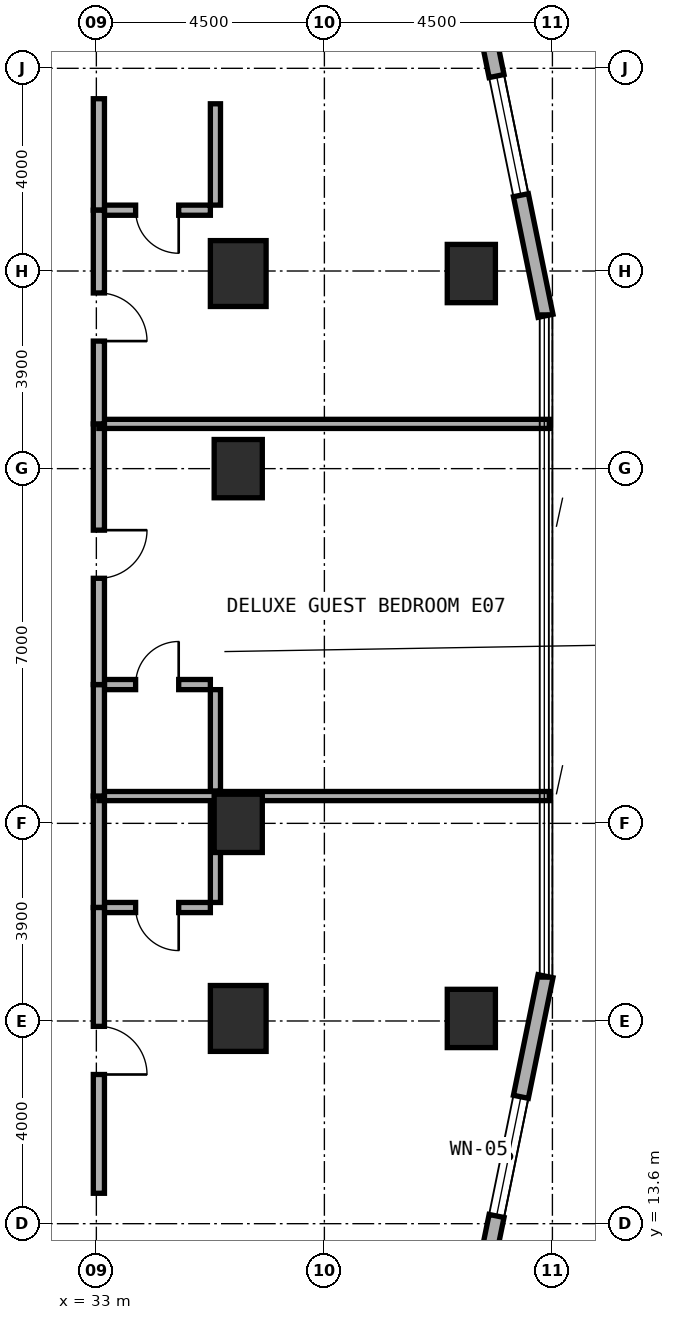
"""IFC4 building model, lengths in metres.
Left out: names, types, materials, properties, quantities, classifications, styles, units other than length and angle.
Written with IfcOpenShell. Run it as: python <this file> out.ifc"""

import sys

from ifc_helpers import new_model, si_unit, direction, frame, frame_2d, origin, origin_2d, place, context, subcontext, project, spatial, rectangle, extrude, element, fill, save


model = new_model("IFC4")
c1 = context("Model", 3, precision=1e-05, world=origin(), true_north=direction((0.0, 1.0)))
c2 = subcontext(c1, "Body", "Model", "MODEL_VIEW")
j1 = project(units=[si_unit("LENGTHUNIT", "METRE"), si_unit("PLANEANGLEUNIT", "RADIAN")], contexts=[c1])
p1 = place(None, origin())
s1 = spatial("IfcSite", under=j1, at=p1, CompositionType="ELEMENT")
p2 = place(p1, origin())
s2 = spatial("IfcBuilding", under=s1, at=p2, CompositionType="ELEMENT")
p3 = place(p2, frame((0.0, 0.0, 52.0)))
s3 = spatial("IfcBuildingStorey", under=s2, at=p3, CompositionType="ELEMENT", Elevation=52.0)
for number, where, z_axis, x_axis in (
    (1, (35.8, 21.5, 0.0), (0.0, 0.0, 1.0), (1.0, 0.0, 0.0)),
    (2, (35.8, 28.5, 0.0), (0.0, 0.0, 1.0), (1.0, 0.0, 0.0)),
):
    element("IfcColumn", number, at=place(p3, frame(where, z_axis=z_axis, x_axis=x_axis)), inside=s3, PredefinedType="COLUMN", context=c2, shape_type="SweptSolid", body=[
        extrude(rectangle(XDim=0.95, YDim=1.15, at=origin_2d()), origin(), (0.0, 0.0, 1.0), 3.5),
    ])
for number, where, z_axis, x_axis in (
    (3, (35.8, 17.65, 0.0), (0.0, 0.0, 1.0), (1.0, 0.0, 0.0)),
    (4, (35.8, 32.35, 0.0), (0.0, 0.0, 1.0), (1.0, 0.0, 0.0)),
):
    element("IfcColumn", number, at=place(p3, frame(where, z_axis=z_axis, x_axis=x_axis)), inside=s3, PredefinedType="COLUMN", context=c2, shape_type="SweptSolid", body=[
        extrude(rectangle(XDim=1.1, YDim=1.3, at=origin_2d()), origin(), (0.0, 0.0, 1.0), 3.5),
    ])
for number, where, z_axis, x_axis in (
    (5, (40.4, 17.65, 0.0), (0.0, 0.0, 1.0), (1.0, 0.0, 0.0)),
    (6, (40.4, 32.35, 0.0), (0.0, 0.0, 1.0), (1.0, 0.0, 0.0)),
):
    element("IfcColumn", number, at=place(p3, frame(where, z_axis=z_axis, x_axis=x_axis)), inside=s3, PredefinedType="COLUMN", context=c2, shape_type="SweptSolid", body=[
        extrude(rectangle(XDim=0.95, YDim=1.15, at=origin_2d()), origin(), (0.0, 0.0, 1.0), 3.5),
    ])
p4 = place(p3, frame((39.851, 8.622, 0.0), z_axis=(0.0, 0.0, 1.0), x_axis=(0.199990901713, 0.979797754249, 0.0)))
e7 = element("IfcWall", 7, at=p4, inside=s3, PredefinedType="STANDARD", context=c2, shape_type="SweptSolid", body=[
    extrude(rectangle(XDim=10.065, YDim=0.3, at=frame_2d((5.033, 0.0))), origin(), (0.0, 0.0, 1.0), 3.22),
])
p5 = place(p4, frame((0.378, 0.0, 0.85)))
e8 = element("IfcOpeningElement", 8, at=p5, cuts=e7, PredefinedType="OPENING", context=c2, shape_type="SweptSolid", body=[
    extrude(rectangle(XDim=1.8, YDim=1.5, at=frame_2d((0.9, 0.75))), frame((0.0, 0.16, 0.0), z_axis=(0.0, -1.0, 0.0), x_axis=(1.0, 0.0, 0.0)), (0.0, 0.0, 1.0), 0.32),
])
p6 = place(p4, frame((5.236, 0.0, 0.8)))
e9 = element("IfcOpeningElement", 9, at=p6, cuts=e7, PredefinedType="OPENING", context=c2, shape_type="SweptSolid", body=[
    extrude(rectangle(XDim=2.4, YDim=1.6, at=frame_2d((1.2, 0.8))), frame((0.0, 0.16, 0.0), z_axis=(0.0, -1.0, 0.0), x_axis=(1.0, 0.0, 0.0)), (0.0, 0.0, 1.0), 0.32),
])
p7 = place(p3, frame((41.864, 31.516, 0.0), z_axis=(0.0, 0.0, 1.0), x_axis=(-0.199990901713, 0.979797754249, 0.0)))
e10 = element("IfcWall", 10, at=p7, inside=s3, PredefinedType="STANDARD", context=c2, shape_type="SweptSolid", body=[
    extrude(rectangle(XDim=10.065, YDim=0.3, at=frame_2d((5.033, 0.0))), origin(), (0.0, 0.0, 1.0), 3.22),
])
p8 = place(p7, frame((2.429, 0.0, 0.8)))
e11 = element("IfcOpeningElement", 11, at=p8, cuts=e10, PredefinedType="OPENING", context=c2, shape_type="SweptSolid", body=[
    extrude(rectangle(XDim=2.4, YDim=1.6, at=frame_2d((1.2, 0.8))), frame((0.0, 0.16, 0.0), z_axis=(0.0, -1.0, 0.0), x_axis=(1.0, 0.0, 0.0)), (0.0, 0.0, 1.0), 0.32),
])
p9 = place(p7, frame((7.887, 0.0, 0.85)))
e12 = element("IfcOpeningElement", 12, at=p9, cuts=e10, PredefinedType="OPENING", context=c2, shape_type="SweptSolid", body=[
    extrude(rectangle(XDim=1.8, YDim=1.5, at=frame_2d((0.9, 0.75))), frame((0.0, 0.16, 0.0), z_axis=(0.0, -1.0, 0.0), x_axis=(1.0, 0.0, 0.0)), (0.0, 0.0, 1.0), 0.32),
])
p10 = place(p3, frame((33.15, 19.839, 0.0), z_axis=(0.0, 0.0, 1.0), x_axis=(1.0, 0.0, 0.0)))
e13 = element("IfcWall", 13, at=p10, inside=s3, PredefinedType="PLUMBINGWALL", context=c2, shape_type="SweptSolid", body=[
    extrude(rectangle(XDim=2.1, YDim=0.2, at=frame_2d((1.05, 0.0))), origin(), (0.0, 0.0, 1.0), 3.22),
])
p11 = place(p10, frame((0.625, 0.0, 0.0)))
e14 = element("IfcOpeningElement", 14, at=p11, cuts=e13, PredefinedType="OPENING", context=c2, shape_type="SweptSolid", body=[
    extrude(rectangle(XDim=0.85, YDim=2.1, at=frame_2d((0.425, 1.05))), frame((0.0, 0.11, 0.0), z_axis=(0.0, -1.0, 0.0), x_axis=(1.0, 0.0, 0.0)), (0.0, 0.0, 1.0), 0.22),
])
p12 = place(p3, frame((35.35, 19.939, 0.0), z_axis=(0.0, 0.0, 1.0), x_axis=(0.0, 1.0, 0.0)))
e15 = element("IfcWall", 15, at=p12, inside=s3, PredefinedType="PLUMBINGWALL", context=c2, shape_type="SweptSolid", body=[
    extrude(rectangle(XDim=2.0, YDim=0.2, at=frame_2d((1.0, 0.0))), origin(), (0.0, 0.0, 1.0), 2.395),
])
p13 = place(p3, frame((33.05, 19.839, 0.0), z_axis=(0.0, 0.0, 1.0), x_axis=(0.0, 1.0, 0.0)))
e16 = element("IfcWall", 16, at=p13, inside=s3, PredefinedType="SOLIDWALL", context=c2, shape_type="SweptSolid", body=[
    extrude(rectangle(XDim=2.2, YDim=0.22, at=frame_2d((1.1, 0.0))), origin(), (0.0, 0.0, 1.0), 2.395),
])
p14 = place(p3, frame((33.05, 14.2, 0.0), z_axis=(0.0, 0.0, 1.0), x_axis=(0.0, 1.0, 0.0)))
e17 = element("IfcWall", 17, at=p14, inside=s3, PredefinedType="SOLIDWALL", context=c2, shape_type="SweptSolid", body=[
    extrude(rectangle(XDim=5.639, YDim=0.22, at=frame_2d((2.82, 0.0))), origin(), (0.0, 0.0, 1.0), 2.395),
])
p15 = place(p14, frame((2.344, 0.0, 0.0)))
e18 = element("IfcOpeningElement", 18, at=p15, cuts=e17, PredefinedType="OPENING", context=c2, shape_type="SweptSolid", body=[
    extrude(rectangle(XDim=0.95, YDim=2.1, at=frame_2d((0.475, 1.05))), frame((0.0, 0.12, 0.0), z_axis=(0.0, -1.0, 0.0), x_axis=(1.0, 0.0, 0.0)), (0.0, 0.0, 1.0), 0.24),
])
p16 = place(p3, frame((33.05, 22.039, 0.0), z_axis=(0.0, 0.0, 1.0), x_axis=(1.0, 0.0, 0.0)))
e19 = element("IfcWall", 19, at=p16, inside=s3, PredefinedType="SOLIDWALL", context=c2, shape_type="SweptSolid", body=[
    extrude(rectangle(XDim=8.89, YDim=0.18, at=frame_2d((4.445, 0.0))), origin(), (0.0, 0.0, 1.0), 2.745),
])
p17 = place(p3, frame((33.15, 24.239, 0.0), z_axis=(0.0, 0.0, 1.0), x_axis=(1.0, 0.0, 0.0)))
e20 = element("IfcWall", 20, at=p17, inside=s3, PredefinedType="PLUMBINGWALL", context=c2, shape_type="SweptSolid", body=[
    extrude(rectangle(XDim=2.1, YDim=0.2, at=frame_2d((1.05, 0.0))), origin(), (0.0, 0.0, 1.0), 3.22),
])
p18 = place(p17, frame((0.625, 0.0, 0.0)))
e21 = element("IfcOpeningElement", 21, at=p18, cuts=e20, PredefinedType="OPENING", context=c2, shape_type="SweptSolid", body=[
    extrude(rectangle(XDim=0.85, YDim=2.1, at=frame_2d((0.425, 1.05))), frame((0.0, 0.11, 0.0), z_axis=(0.0, -1.0, 0.0), x_axis=(1.0, 0.0, 0.0)), (0.0, 0.0, 1.0), 0.22),
])
p19 = place(p3, frame((35.35, 22.139, 0.0), z_axis=(0.0, 0.0, 1.0), x_axis=(0.0, 1.0, 0.0)))
e22 = element("IfcWall", 22, at=p19, inside=s3, PredefinedType="PLUMBINGWALL", context=c2, shape_type="SweptSolid", body=[
    extrude(rectangle(XDim=2.0, YDim=0.2, at=frame_2d((1.0, 0.0))), origin(), (0.0, 0.0, 1.0), 3.22),
])
p20 = place(p3, frame((33.05, 22.039, 0.0), z_axis=(0.0, 0.0, 1.0), x_axis=(0.0, 1.0, 0.0)))
e23 = element("IfcWall", 23, at=p20, inside=s3, PredefinedType="SOLIDWALL", context=c2, shape_type="SweptSolid", body=[
    extrude(rectangle(XDim=2.2, YDim=0.22, at=frame_2d((1.1, 0.0))), origin(), (0.0, 0.0, 1.0), 3.22),
])
p21 = place(p3, frame((33.05, 24.239, 0.0), z_axis=(0.0, 0.0, 1.0), x_axis=(0.0, 1.0, 0.0)))
e24 = element("IfcWall", 24, at=p21, inside=s3, PredefinedType="SOLIDWALL", context=c2, shape_type="SweptSolid", body=[
    extrude(rectangle(XDim=5.144, YDim=0.22, at=frame_2d((2.572, 0.0))), origin(), (0.0, 0.0, 1.0), 2.395),
])
p22 = place(p21, frame((2.097, 0.0, 0.0)))
e25 = element("IfcOpeningElement", 25, at=p22, cuts=e24, PredefinedType="OPENING", context=c2, shape_type="SweptSolid", body=[
    extrude(rectangle(XDim=0.95, YDim=2.1, at=frame_2d((0.475, 1.05))), frame((0.0, 0.12, 0.0), z_axis=(0.0, -1.0, 0.0), x_axis=(1.0, 0.0, 0.0)), (0.0, 0.0, 1.0), 0.24),
])
p23 = place(p3, frame((33.05, 29.383, 0.0), z_axis=(0.0, 0.0, 1.0), x_axis=(1.0, 0.0, 0.0)))
e26 = element("IfcWall", 26, at=p23, inside=s3, PredefinedType="SOLIDWALL", context=c2, shape_type="SweptSolid", body=[
    extrude(rectangle(XDim=8.89, YDim=0.18, at=frame_2d((4.445, 0.0))), origin(), (0.0, 0.0, 1.0), 2.745),
])
p24 = place(p3, frame((33.15, 33.6, 0.0), z_axis=(0.0, 0.0, 1.0), x_axis=(1.0, 0.0, 0.0)))
e27 = element("IfcWall", 27, at=p24, inside=s3, PredefinedType="PLUMBINGWALL", context=c2, shape_type="SweptSolid", body=[
    extrude(rectangle(XDim=2.1, YDim=0.2, at=frame_2d((1.05, 0.0))), origin(), (0.0, 0.0, 1.0), 3.22),
])
p25 = place(p24, frame((0.625, 0.0, 0.0)))
e28 = element("IfcOpeningElement", 28, at=p25, cuts=e27, PredefinedType="OPENING", context=c2, shape_type="SweptSolid", body=[
    extrude(rectangle(XDim=0.85, YDim=2.1, at=frame_2d((0.425, 1.05))), frame((0.0, 0.11, 0.0), z_axis=(0.0, -1.0, 0.0), x_axis=(1.0, 0.0, 0.0)), (0.0, 0.0, 1.0), 0.22),
])
p26 = place(p3, frame((35.35, 33.7, 0.0), z_axis=(0.0, 0.0, 1.0), x_axis=(0.0, 1.0, 0.0)))
e29 = element("IfcWall", 29, at=p26, inside=s3, PredefinedType="PLUMBINGWALL", context=c2, shape_type="SweptSolid", body=[
    extrude(rectangle(XDim=2.0, YDim=0.2, at=frame_2d((1.0, 0.0))), origin(), (0.0, 0.0, 1.0), 2.745),
])
p27 = place(p3, frame((33.05, 33.6, 0.0), z_axis=(0.0, 0.0, 1.0), x_axis=(0.0, 1.0, 0.0)))
e30 = element("IfcWall", 30, at=p27, inside=s3, PredefinedType="SOLIDWALL", context=c2, shape_type="SweptSolid", body=[
    extrude(rectangle(XDim=2.2, YDim=0.22, at=frame_2d((1.1, 0.0))), origin(), (0.0, 0.0, 1.0), 3.22),
])
p28 = place(p3, frame((33.05, 29.383, 0.0), z_axis=(0.0, 0.0, 1.0), x_axis=(0.0, 1.0, 0.0)))
e31 = element("IfcWall", 31, at=p28, inside=s3, PredefinedType="SOLIDWALL", context=c2, shape_type="SweptSolid", body=[
    extrude(rectangle(XDim=4.217, YDim=0.22, at=frame_2d((2.108, 0.0))), origin(), (0.0, 0.0, 1.0), 2.395),
])
p29 = place(p28, frame((1.634, 0.0, 0.0)))
e32 = element("IfcOpeningElement", 32, at=p29, cuts=e31, PredefinedType="OPENING", context=c2, shape_type="SweptSolid", body=[
    extrude(rectangle(XDim=0.95, YDim=2.1, at=frame_2d((0.475, 1.05))), frame((0.0, 0.12, 0.0), z_axis=(0.0, -1.0, 0.0), x_axis=(1.0, 0.0, 0.0)), (0.0, 0.0, 1.0), 0.24),
])
p30 = place(p6, origin())
e33 = element("IfcWindow", 33, at=p30, inside=s3, PartitioningType="SINGLE_PANEL", PredefinedType="WINDOW", context=c2, shape_type="SweptSolid", body=[
    extrude(rectangle(XDim=2.4, YDim=1.6, at=frame_2d((1.2, 0.8))), frame((0.0, 0.03, 0.0), z_axis=(0.0, -1.0, 0.0), x_axis=(1.0, 0.0, 0.0)), (0.0, 0.0, 1.0), 0.06),
])
fill(e9, e33)
p31 = place(p8, origin())
e34 = element("IfcWindow", 34, at=p31, inside=s3, PartitioningType="SINGLE_PANEL", PredefinedType="WINDOW", context=c2, shape_type="SweptSolid", body=[
    extrude(rectangle(XDim=2.4, YDim=1.6, at=frame_2d((1.2, 0.8))), frame((0.0, 0.03, 0.0), z_axis=(0.0, -1.0, 0.0), x_axis=(1.0, 0.0, 0.0)), (0.0, 0.0, 1.0), 0.06),
])
fill(e11, e34)
p32 = place(p11, frame((0.85, 0.0, 0.0), z_axis=(0.0, 0.0, 1.0), x_axis=(-1.0, 0.0, 0.0)))
e35 = element("IfcDoor", 35, at=p32, inside=s3, OperationType="SINGLE_SWING_LEFT", PredefinedType="DOOR", context=c2, shape_type="SweptSolid", body=[
    extrude(rectangle(XDim=0.85, YDim=2.1, at=frame_2d((0.425, 1.05))), frame((0.0, 0.025, 0.0), z_axis=(0.0, -1.0, 0.0), x_axis=(1.0, 0.0, 0.0)), (0.0, 0.0, 1.0), 0.05),
])
fill(e14, e35)
p33 = place(p15, frame((0.95, 0.0, 0.0), z_axis=(0.0, 0.0, 1.0), x_axis=(-1.0, 0.0, 0.0)))
e36 = element("IfcDoor", 36, at=p33, inside=s3, OperationType="SINGLE_SWING_RIGHT", PredefinedType="DOOR", context=c2, shape_type="SweptSolid", body=[
    extrude(rectangle(XDim=0.95, YDim=2.1, at=frame_2d((0.475, 1.05))), frame((0.0, 0.025, 0.0), z_axis=(0.0, -1.0, 0.0), x_axis=(1.0, 0.0, 0.0)), (0.0, 0.0, 1.0), 0.05),
])
fill(e18, e36)
p34 = place(p18, origin())
e37 = element("IfcDoor", 37, at=p34, inside=s3, OperationType="SINGLE_SWING_RIGHT", PredefinedType="DOOR", context=c2, shape_type="SweptSolid", body=[
    extrude(rectangle(XDim=0.85, YDim=2.1, at=frame_2d((0.425, 1.05))), frame((0.0, 0.025, 0.0), z_axis=(0.0, -1.0, 0.0), x_axis=(1.0, 0.0, 0.0)), (0.0, 0.0, 1.0), 0.05),
])
fill(e21, e37)
p35 = place(p22, frame((0.95, 0.0, 0.0), z_axis=(0.0, 0.0, 1.0), x_axis=(-1.0, 0.0, 0.0)))
e38 = element("IfcDoor", 38, at=p35, inside=s3, OperationType="SINGLE_SWING_LEFT", PredefinedType="DOOR", context=c2, shape_type="SweptSolid", body=[
    extrude(rectangle(XDim=0.95, YDim=2.1, at=frame_2d((0.475, 1.05))), frame((0.0, 0.025, 0.0), z_axis=(0.0, -1.0, 0.0), x_axis=(1.0, 0.0, 0.0)), (0.0, 0.0, 1.0), 0.05),
])
fill(e25, e38)
p36 = place(p25, frame((0.85, 0.0, 0.0), z_axis=(0.0, 0.0, 1.0), x_axis=(-1.0, 0.0, 0.0)))
e39 = element("IfcDoor", 39, at=p36, inside=s3, OperationType="SINGLE_SWING_LEFT", PredefinedType="DOOR", context=c2, shape_type="SweptSolid", body=[
    extrude(rectangle(XDim=0.85, YDim=2.1, at=frame_2d((0.425, 1.05))), frame((0.0, 0.025, 0.0), z_axis=(0.0, -1.0, 0.0), x_axis=(1.0, 0.0, 0.0)), (0.0, 0.0, 1.0), 0.05),
])
fill(e28, e39)
p37 = place(p29, frame((0.95, 0.0, 0.0), z_axis=(0.0, 0.0, 1.0), x_axis=(-1.0, 0.0, 0.0)))
e40 = element("IfcDoor", 40, at=p37, inside=s3, OperationType="SINGLE_SWING_RIGHT", PredefinedType="DOOR", context=c2, shape_type="SweptSolid", body=[
    extrude(rectangle(XDim=0.95, YDim=2.1, at=frame_2d((0.475, 1.05))), frame((0.0, 0.025, 0.0), z_axis=(0.0, -1.0, 0.0), x_axis=(1.0, 0.0, 0.0)), (0.0, 0.0, 1.0), 0.05),
])
fill(e32, e40)
save(model, sys.argv[1])
